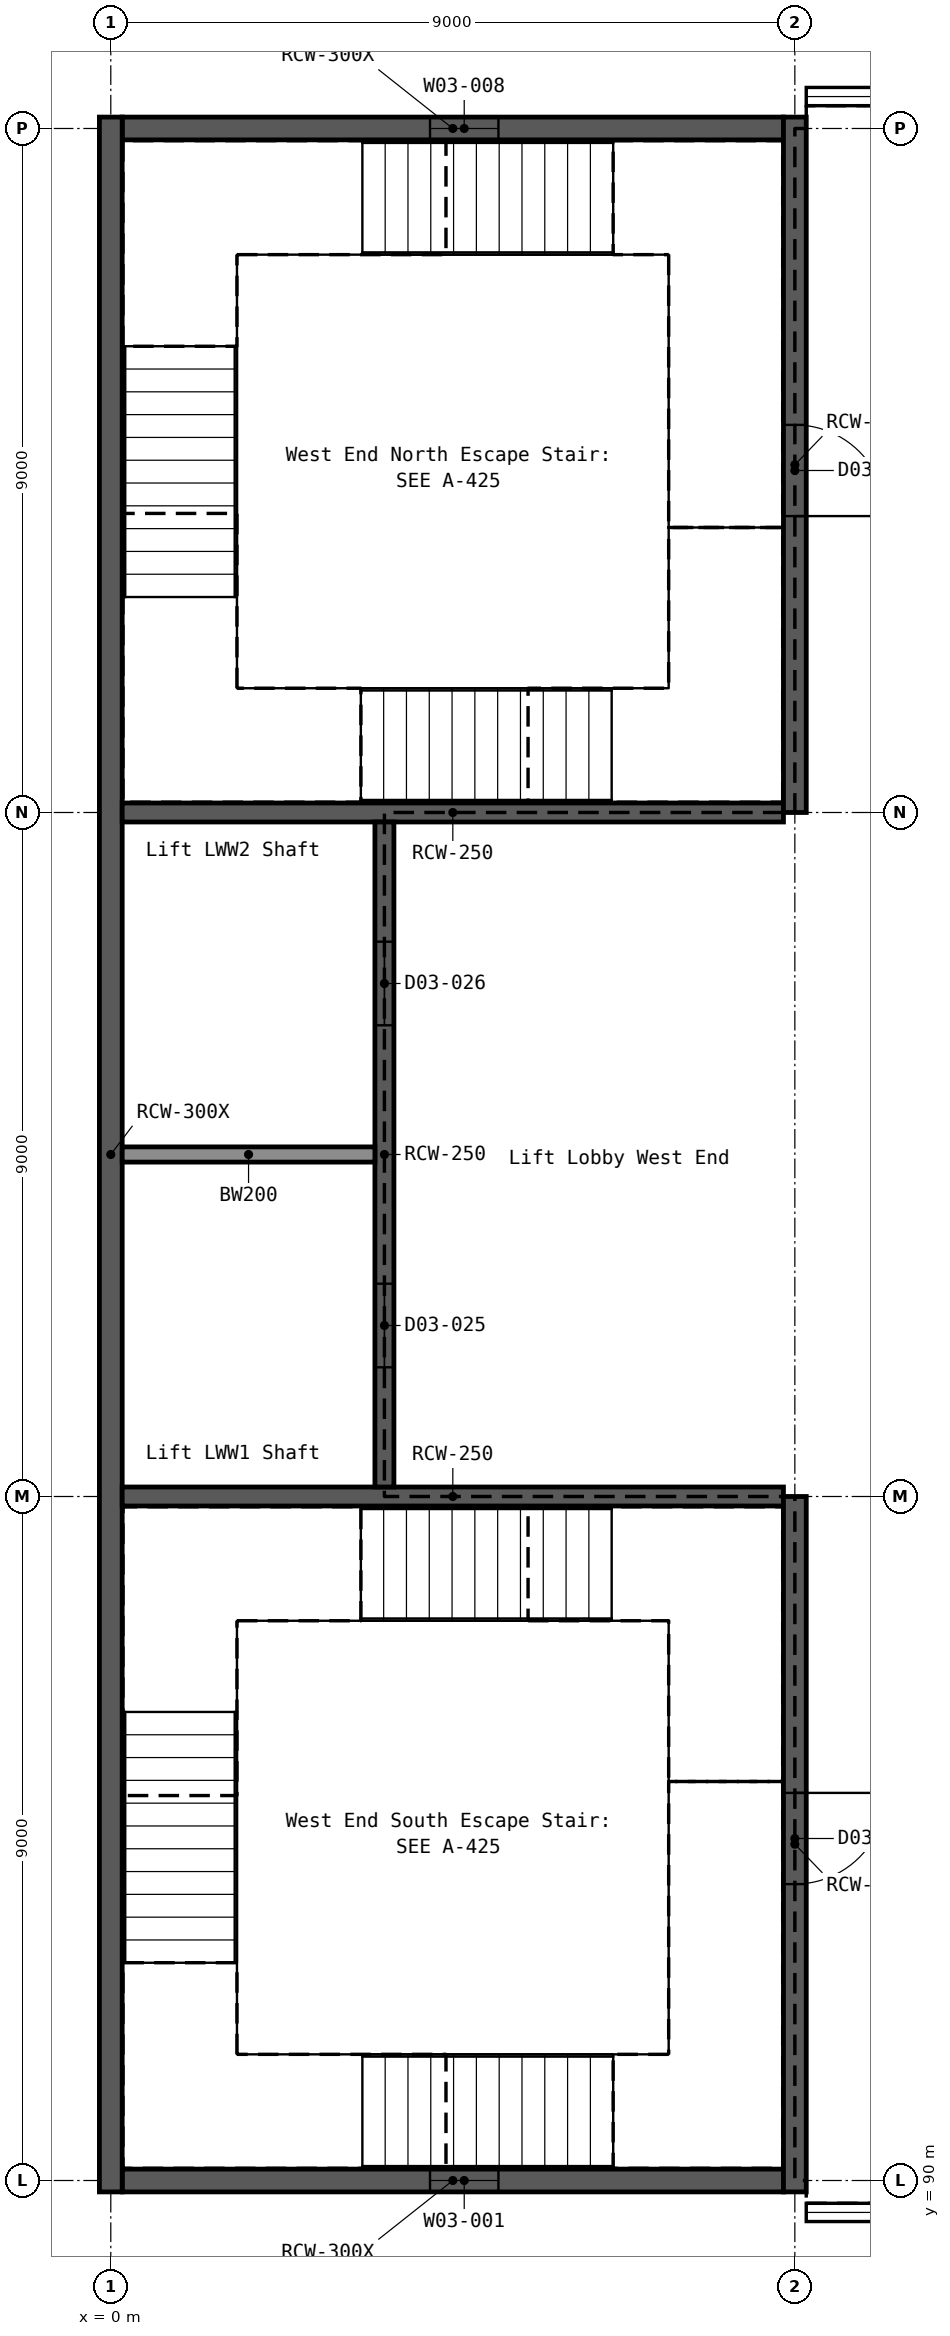
"""IFC4 building model, lengths in metres.
Left out: names, types, materials, properties, quantities, classifications, styles, units other than length and angle.
Written with IfcOpenShell. Run it as: python <this file> out.ifc"""

import sys

from ifc_helpers import new_model, si_unit, direction, frame, frame_2d, origin, place, context, subcontext, project, spatial, rectangle, extrude, element, fill, save


model = new_model("IFC4")
c1 = context("Model", 3, precision=1e-05, world=origin(), true_north=direction((0.0, 1.0)))
c2 = subcontext(c1, "Body", "Model", "MODEL_VIEW")
j1 = project(units=[si_unit("LENGTHUNIT", "METRE"), si_unit("PLANEANGLEUNIT", "RADIAN")], contexts=[c1])
p1 = place(None, origin())
s1 = spatial("IfcSite", under=j1, at=p1, CompositionType="ELEMENT")
p2 = place(p1, origin())
s2 = spatial("IfcBuilding", under=s1, at=p2, CompositionType="ELEMENT")
p3 = place(p2, frame((0.0, 0.0, 16.2)))
s3 = spatial("IfcBuildingStorey", under=s2, at=p3, CompositionType="ELEMENT", Elevation=16.2)
p4 = place(p3, frame((0.15, 90.0, 0.0), z_axis=(0.0, 0.0, 1.0), x_axis=(1.0, 0.0, 0.0)))
e1 = element("IfcWall", 1, at=p4, inside=s3, PredefinedType="SHEAR", context=c2, shape_type="SweptSolid", body=[
    extrude(rectangle(XDim=8.7, YDim=0.3, at=frame_2d((4.35, 0.0))), origin(), (0.0, 0.0, 1.0), 5.4),
])
p5 = place(p4, frame((4.05, 0.0, 1.5)))
e2 = element("IfcOpeningElement", 2, at=p5, cuts=e1, PredefinedType="OPENING", context=c2, shape_type="SweptSolid", body=[
    extrude(rectangle(XDim=0.9, YDim=1.2, at=frame_2d((0.45, 0.6))), frame((0.0, 0.161, 0.0), z_axis=(0.0, -1.0, 0.0), x_axis=(1.0, 0.0, 0.0)), (0.0, 0.0, 1.0), 0.322),
])
p6 = place(p3, frame((0.15, 117.0, 0.0), z_axis=(0.0, 0.0, 1.0), x_axis=(1.0, 0.0, 0.0)))
e3 = element("IfcWall", 3, at=p6, inside=s3, PredefinedType="SHEAR", context=c2, shape_type="SweptSolid", body=[
    extrude(rectangle(XDim=8.7, YDim=0.3, at=frame_2d((4.35, 0.0))), origin(), (0.0, 0.0, 1.0), 5.4),
])
p7 = place(p6, frame((4.05, 0.0, 1.5)))
e4 = element("IfcOpeningElement", 4, at=p7, cuts=e3, PredefinedType="OPENING", context=c2, shape_type="SweptSolid", body=[
    extrude(rectangle(XDim=0.9, YDim=1.2, at=frame_2d((0.45, 0.6))), frame((0.0, 0.161, 0.0), z_axis=(0.0, -1.0, 0.0), x_axis=(1.0, 0.0, 0.0)), (0.0, 0.0, 1.0), 0.322),
])
p8 = place(p3, frame((0.0, 89.85, 0.0), z_axis=(0.0, 0.0, 1.0), x_axis=(0.0, 1.0, 0.0)))
e5 = element("IfcWall", 5, at=p8, inside=s3, PredefinedType="SHEAR", context=c2, shape_type="SweptSolid", body=[
    extrude(rectangle(XDim=27.3, YDim=0.3, at=frame_2d((13.65, 0.0))), origin(), (0.0, 0.0, 1.0), 5.4),
])
for number, where, z_axis, x_axis in (
    (6, (0.15, 99.0, 0.0), (0.0, 0.0, 1.0), (1.0, 0.0, 0.0)),
    (7, (0.15, 108.0, 0.0), (0.0, 0.0, 1.0), (1.0, 0.0, 0.0)),
):
    element("IfcWall", number, at=place(p3, frame(where, z_axis=z_axis, x_axis=x_axis)), inside=s3, PredefinedType="SHEAR", context=c2, shape_type="SweptSolid", body=[
        extrude(rectangle(XDim=8.7, YDim=0.25, at=frame_2d((4.35, 0.0))), origin(), (0.0, 0.0, 1.0), 5.4),
    ])
p9 = place(p3, frame((3.6, 99.125, 0.0), z_axis=(0.0, 0.0, 1.0), x_axis=(0.0, 1.0, 0.0)))
e8 = element("IfcWall", 8, at=p9, inside=s3, PredefinedType="SHEAR", context=c2, shape_type="SweptSolid", body=[
    extrude(rectangle(XDim=8.75, YDim=0.25, at=frame_2d((4.375, 0.0))), origin(), (0.0, 0.0, 1.0), 5.4),
])
p10 = place(p9, frame((1.575, 0.0, 0.0)))
e9 = element("IfcOpeningElement", 9, at=p10, cuts=e8, PredefinedType="OPENING", context=c2, shape_type="SweptSolid", body=[
    extrude(rectangle(XDim=1.1, YDim=2.1, at=frame_2d((0.55, 1.05))), frame((0.0, 0.136, 0.0), z_axis=(0.0, -1.0, 0.0), x_axis=(1.0, 0.0, 0.0)), (0.0, 0.0, 1.0), 0.272),
])
p11 = place(p9, frame((6.075, 0.0, 0.0)))
e10 = element("IfcOpeningElement", 10, at=p11, cuts=e8, PredefinedType="OPENING", context=c2, shape_type="SweptSolid", body=[
    extrude(rectangle(XDim=1.1, YDim=2.1, at=frame_2d((0.55, 1.05))), frame((0.0, 0.136, 0.0), z_axis=(0.0, -1.0, 0.0), x_axis=(1.0, 0.0, 0.0)), (0.0, 0.0, 1.0), 0.272),
])
p12 = place(p3, frame((9.0, 89.85, 0.0), z_axis=(0.0, 0.0, 1.0), x_axis=(0.0, 1.0, 0.0)))
e11 = element("IfcWall", 11, at=p12, inside=s3, PredefinedType="SHEAR", context=c2, shape_type="SweptSolid", body=[
    extrude(rectangle(XDim=9.15, YDim=0.3, at=frame_2d((4.575, 0.0))), origin(), (0.0, 0.0, 1.0), 5.4),
])
p13 = place(p12, frame((4.05, 0.0, 0.0)))
e12 = element("IfcOpeningElement", 12, at=p13, cuts=e11, PredefinedType="OPENING", context=c2, shape_type="SweptSolid", body=[
    extrude(rectangle(XDim=1.2, YDim=2.1, at=frame_2d((0.6, 1.05))), frame((0.0, 0.161, 0.0), z_axis=(0.0, -1.0, 0.0), x_axis=(1.0, 0.0, 0.0)), (0.0, 0.0, 1.0), 0.322),
])
p14 = place(p3, frame((9.0, 108.0, 0.0), z_axis=(0.0, 0.0, 1.0), x_axis=(0.0, 1.0, 0.0)))
e13 = element("IfcWall", 13, at=p14, inside=s3, PredefinedType="SHEAR", context=c2, shape_type="SweptSolid", body=[
    extrude(rectangle(XDim=9.15, YDim=0.3, at=frame_2d((4.575, 0.0))), origin(), (0.0, 0.0, 1.0), 5.4),
])
p15 = place(p14, frame((3.9, 0.0, 0.0)))
e14 = element("IfcOpeningElement", 14, at=p15, cuts=e13, PredefinedType="OPENING", context=c2, shape_type="SweptSolid", body=[
    extrude(rectangle(XDim=1.2, YDim=2.1, at=frame_2d((0.6, 1.05))), frame((0.0, 0.161, 0.0), z_axis=(0.0, -1.0, 0.0), x_axis=(1.0, 0.0, 0.0)), (0.0, 0.0, 1.0), 0.322),
])
p16 = place(p3, frame((0.15, 103.5, 0.0), z_axis=(0.0, 0.0, 1.0), x_axis=(1.0, 0.0, 0.0)))
e15 = element("IfcWall", 15, at=p16, inside=s3, PredefinedType="SOLIDWALL", context=c2, shape_type="SweptSolid", body=[
    extrude(rectangle(XDim=3.325, YDim=0.2, at=frame_2d((1.663, 0.0))), origin(), (0.0, 0.0, 1.0), 5.4),
])
p17 = place(p5, origin())
e16 = element("IfcWindow", 16, at=p17, inside=s3, PartitioningType="SINGLE_PANEL", PredefinedType="WINDOW", context=c2, shape_type="SweptSolid", body=[
    extrude(rectangle(XDim=0.9, YDim=1.2, at=frame_2d((0.45, 0.6))), frame((0.0, 0.03, 0.0), z_axis=(0.0, -1.0, 0.0), x_axis=(1.0, 0.0, 0.0)), (0.0, 0.0, 1.0), 0.06),
])
fill(e2, e16)
p18 = place(p7, origin())
e17 = element("IfcWindow", 17, at=p18, inside=s3, PartitioningType="SINGLE_PANEL", PredefinedType="WINDOW", context=c2, shape_type="SweptSolid", body=[
    extrude(rectangle(XDim=0.9, YDim=1.2, at=frame_2d((0.45, 0.6))), frame((0.0, 0.03, 0.0), z_axis=(0.0, -1.0, 0.0), x_axis=(1.0, 0.0, 0.0)), (0.0, 0.0, 1.0), 0.06),
])
fill(e4, e17)
p19 = place(p13, frame((1.2, 0.0, 0.0), z_axis=(0.0, 0.0, 1.0), x_axis=(-1.0, 0.0, 0.0)))
e18 = element("IfcDoor", 18, at=p19, inside=s3, OperationType="SINGLE_SWING_LEFT", PredefinedType="DOOR", context=c2, shape_type="SweptSolid", body=[
    extrude(rectangle(XDim=1.2, YDim=2.1, at=frame_2d((0.6, 1.05))), frame((0.0, 0.025, 0.0), z_axis=(0.0, -1.0, 0.0), x_axis=(1.0, 0.0, 0.0)), (0.0, 0.0, 1.0), 0.05),
])
fill(e12, e18)
p20 = place(p15, frame((1.2, 0.0, 0.0), z_axis=(0.0, 0.0, 1.0), x_axis=(-1.0, 0.0, 0.0)))
e19 = element("IfcDoor", 19, at=p20, inside=s3, OperationType="SINGLE_SWING_RIGHT", PredefinedType="DOOR", context=c2, shape_type="SweptSolid", body=[
    extrude(rectangle(XDim=1.2, YDim=2.1, at=frame_2d((0.6, 1.05))), frame((0.0, 0.025, 0.0), z_axis=(0.0, -1.0, 0.0), x_axis=(1.0, 0.0, 0.0)), (0.0, 0.0, 1.0), 0.05),
])
fill(e14, e19)
p21 = place(p10, origin())
e20 = element("IfcDoor", 20, at=p21, inside=s3, OperationType="DOUBLE_DOOR_SLIDING", PredefinedType="DOOR", context=c2, shape_type="SweptSolid", body=[
    extrude(rectangle(XDim=1.1, YDim=2.1, at=frame_2d((0.55, 1.05))), frame((0.0, 0.025, 0.0), z_axis=(0.0, -1.0, 0.0), x_axis=(1.0, 0.0, 0.0)), (0.0, 0.0, 1.0), 0.05),
])
fill(e9, e20)
p22 = place(p11, origin())
e21 = element("IfcDoor", 21, at=p22, inside=s3, OperationType="DOUBLE_DOOR_SLIDING", PredefinedType="DOOR", context=c2, shape_type="SweptSolid", body=[
    extrude(rectangle(XDim=1.1, YDim=2.1, at=frame_2d((0.55, 1.05))), frame((0.0, 0.025, 0.0), z_axis=(0.0, -1.0, 0.0), x_axis=(1.0, 0.0, 0.0)), (0.0, 0.0, 1.0), 0.05),
])
fill(e10, e21)
save(model, sys.argv[1])
